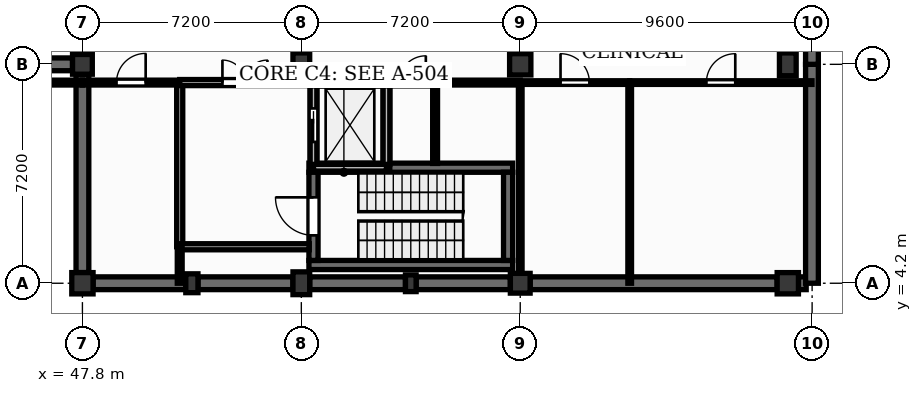
"""IFC4 building model, lengths in metres.
Left out: names, types, materials, properties, quantities, classifications, styles, units other than length and angle.
Written with IfcOpenShell. Run it as: python <this file> out.ifc"""

import sys

from ifc_helpers import new_model, si_unit, direction, frame, frame_2d, origin, origin_2d, place, context, subcontext, project, spatial, rectangle, extrude, element, fill, save


model = new_model("IFC4")
c1 = context("Model", 3, precision=1e-05, world=origin(), true_north=direction((0.0, 1.0)))
c2 = subcontext(c1, "Body", "Model", "MODEL_VIEW")
j1 = project(units=[si_unit("LENGTHUNIT", "METRE"), si_unit("PLANEANGLEUNIT", "RADIAN")], contexts=[c1])
p1 = place(None, origin())
s1 = spatial("IfcSite", under=j1, at=p1, CompositionType="ELEMENT")
p2 = place(p1, origin())
s2 = spatial("IfcBuilding", under=s1, at=p2, CompositionType="ELEMENT")
p3 = place(p2, frame((0.0, 0.0, -4.5)))
s3 = spatial("IfcBuildingStorey", under=s2, at=p3, CompositionType="ELEMENT", Elevation=-4.5)
p4 = place(p3, frame((47.8, 4.2, 0.0), z_axis=(0.0, 0.0, 1.0), x_axis=(1.0, 0.0, 0.0)))
e1 = element("IfcColumn", 1, at=p4, inside=s3, PredefinedType="COLUMN", context=c2, shape_type="SweptSolid", body=[
    extrude(rectangle(XDim=0.7, YDim=0.7, at=origin_2d()), origin(), (0.0, 0.0, 1.0), 4.2),
])
p5 = place(p3, frame((47.8, 11.4, 0.0), z_axis=(0.0, 0.0, 1.0), x_axis=(1.0, 0.0, 0.0)))
e2 = element("IfcColumn", 2, at=p5, inside=s3, PredefinedType="COLUMN", context=c2, shape_type="SweptSolid", body=[
    extrude(rectangle(XDim=0.65, YDim=0.65, at=origin_2d()), origin(), (0.0, 0.0, 1.0), 4.2),
])
for number, where, z_axis, x_axis in (
    (3, (55.0, 4.2, 0.0), (0.0, 0.0, 1.0), (1.0, 0.0, 0.0)),
    (4, (55.0, 11.4, 0.0), (0.0, 0.0, 1.0), (1.0, 0.0, 0.0)),
):
    element("IfcColumn", number, at=place(p3, frame(where, z_axis=z_axis, x_axis=x_axis)), inside=s3, PredefinedType="COLUMN", context=c2, shape_type="SweptSolid", body=[
        extrude(rectangle(XDim=0.55, YDim=0.75, at=origin_2d()), origin(), (0.0, 0.0, 1.0), 4.2),
    ])
p6 = place(p3, frame((62.2, 4.2, 0.0), z_axis=(0.0, 0.0, 1.0), x_axis=(1.0, 0.0, 0.0)))
e5 = element("IfcColumn", 5, at=p6, inside=s3, PredefinedType="COLUMN", context=c2, shape_type="SweptSolid", body=[
    extrude(rectangle(XDim=0.65, YDim=0.65, at=origin_2d()), origin(), (0.0, 0.0, 1.0), 4.2),
])
for number, where, z_axis, x_axis in (
    (6, (62.2, 11.4, 0.0), (0.0, 0.0, 1.0), (1.0, 0.0, 0.0)),
    (7, (71.0, 4.2, 0.0), (0.0, 0.0, 1.0), (1.0, 0.0, 0.0)),
):
    element("IfcColumn", number, at=place(p3, frame(where, z_axis=z_axis, x_axis=x_axis)), inside=s3, PredefinedType="COLUMN", context=c2, shape_type="SweptSolid", body=[
        extrude(rectangle(XDim=0.7, YDim=0.7, at=origin_2d()), origin(), (0.0, 0.0, 1.0), 4.2),
    ])
p7 = place(p3, frame((71.0, 11.4, 0.0), z_axis=(0.0, 0.0, 1.0), x_axis=(1.0, 0.0, 0.0)))
e8 = element("IfcColumn", 8, at=p7, inside=s3, PredefinedType="COLUMN", context=c2, shape_type="SweptSolid", body=[
    extrude(rectangle(XDim=0.55, YDim=0.75, at=origin_2d()), origin(), (0.0, 0.0, 1.0), 4.2),
])
p8 = place(p3, frame((51.4, 4.2, 0.0), z_axis=(0.0, 0.0, 1.0), x_axis=(1.0, 0.0, 0.0)))
e9 = element("IfcColumn", 9, at=p8, inside=s3, PredefinedType="PILASTER", context=c2, shape_type="SweptSolid", body=[
    extrude(rectangle(XDim=0.4, YDim=0.62, at=origin_2d()), origin(), (0.0, 0.0, 1.0), 4.2),
])
p9 = place(p3, frame((58.6, 4.2, 0.0), z_axis=(0.0, 0.0, 1.0), x_axis=(1.0, 0.0, 0.0)))
e10 = element("IfcColumn", 10, at=p9, inside=s3, PredefinedType="PILASTER", context=c2, shape_type="SweptSolid", body=[
    extrude(rectangle(XDim=0.35, YDim=0.55, at=origin_2d()), origin(), (0.0, 0.0, 1.0), 4.2),
])
p10 = place(p3, frame((40.95, 11.4, 0.0), z_axis=(0.0, 0.0, 1.0), x_axis=(1.0, 0.0, 0.0)))
e11 = element("IfcWall", 11, at=p10, inside=s3, PredefinedType="USERDEFINED", context=c2, shape_type="SweptSolid", body=[
    extrude(rectangle(XDim=6.525, YDim=0.42, at=frame_2d((3.263, 0.0))), origin(), (0.0, 0.0, 1.0), 4.2),
])
p11 = place(p3, frame((48.15, 4.2, 0.0), z_axis=(0.0, 0.0, 1.0), x_axis=(1.0, 0.0, 0.0)))
e12 = element("IfcWall", 12, at=p11, inside=s3, PredefinedType="USERDEFINED", context=c2, shape_type="SweptSolid", body=[
    extrude(rectangle(XDim=3.05, YDim=0.42, at=frame_2d((1.525, 0.0))), origin(), (0.0, 0.0, 1.0), 4.2),
])
p12 = place(p3, frame((51.6, 4.2, 0.0), z_axis=(0.0, 0.0, 1.0), x_axis=(1.0, 0.0, 0.0)))
e13 = element("IfcWall", 13, at=p12, inside=s3, PredefinedType="USERDEFINED", context=c2, shape_type="SweptSolid", body=[
    extrude(rectangle(XDim=3.125, YDim=0.42, at=frame_2d((1.562, 0.0))), origin(), (0.0, 0.0, 1.0), 4.2),
])
p13 = place(p3, frame((47.8, 4.55, 0.0), z_axis=(0.0, 0.0, 1.0), x_axis=(0.0, 1.0, 0.0)))
e14 = element("IfcWall", 14, at=p13, inside=s3, PredefinedType="USERDEFINED", context=c2, shape_type="SweptSolid", body=[
    extrude(rectangle(XDim=6.525, YDim=0.42, at=frame_2d((3.262, 0.0))), origin(), (0.0, 0.0, 1.0), 4.2),
])
p14 = place(p3, frame((55.275, 4.2, 0.0), z_axis=(0.0, 0.0, 1.0), x_axis=(1.0, 0.0, 0.0)))
e15 = element("IfcWall", 15, at=p14, inside=s3, PredefinedType="USERDEFINED", context=c2, shape_type="SweptSolid", body=[
    extrude(rectangle(XDim=3.15, YDim=0.42, at=frame_2d((1.575, 0.0))), origin(), (0.0, 0.0, 1.0), 4.2),
])
p15 = place(p3, frame((58.775, 4.2, 0.0), z_axis=(0.0, 0.0, 1.0), x_axis=(1.0, 0.0, 0.0)))
e16 = element("IfcWall", 16, at=p15, inside=s3, PredefinedType="USERDEFINED", context=c2, shape_type="SweptSolid", body=[
    extrude(rectangle(XDim=3.1, YDim=0.42, at=frame_2d((1.55, 0.0))), origin(), (0.0, 0.0, 1.0), 4.2),
])
p16 = place(p3, frame((62.525, 4.2, 0.0), z_axis=(0.0, 0.0, 1.0), x_axis=(1.0, 0.0, 0.0)))
e17 = element("IfcWall", 17, at=p16, inside=s3, PredefinedType="USERDEFINED", context=c2, shape_type="SweptSolid", body=[
    extrude(rectangle(XDim=8.125, YDim=0.42, at=frame_2d((4.062, 0.0))), origin(), (0.0, 0.0, 1.0), 4.2),
])
p17 = place(p3, frame((71.35, 4.2, 0.0), z_axis=(0.0, 0.0, 1.0), x_axis=(1.0, 0.0, 0.0)))
e18 = element("IfcWall", 18, at=p17, inside=s3, PredefinedType="USERDEFINED", context=c2, shape_type="SweptSolid", body=[
    extrude(rectangle(XDim=0.255, YDim=0.42, at=frame_2d((0.127, 0.0))), origin(), (0.0, 0.0, 1.0), 4.2),
])
p18 = place(p3, frame((71.795, 4.2, 0.0), z_axis=(0.0, 0.0, 1.0), x_axis=(0.0, 1.0, 0.0)))
e19 = element("IfcWall", 19, at=p18, inside=s3, PredefinedType="USERDEFINED", context=c2, shape_type="SweptSolid", body=[
    extrude(rectangle(XDim=7.2, YDim=0.42, at=frame_2d((3.6, 0.0))), origin(), (0.0, 0.0, 1.0), 4.2),
])
p19 = place(p3, frame((71.795, 11.4, 0.0), z_axis=(0.0, 0.0, 1.0), x_axis=(0.0, 1.0, 0.0)))
e20 = element("IfcWall", 20, at=p19, inside=s3, PredefinedType="USERDEFINED", context=c2, shape_type="SweptSolid", body=[
    extrude(rectangle(XDim=7.2, YDim=0.42, at=frame_2d((3.6, 0.0))), origin(), (0.0, 0.0, 1.0), 4.2),
])
for number, where, z_axis, x_axis in (
    (21, (55.25, 4.8, 0.0), (0.0, 0.0, 1.0), (1.0, 0.0, 0.0)),
    (22, (55.25, 8.0, 0.0), (0.0, 0.0, 1.0), (1.0, 0.0, 0.0)),
):
    element("IfcWall", number, at=place(p3, frame(where, z_axis=z_axis, x_axis=x_axis)), inside=s3, PredefinedType="SHEAR", context=c2, shape_type="SweptSolid", body=[
        extrude(rectangle(XDim=6.7, YDim=0.3, at=frame_2d((3.35, 0.0))), origin(), (0.0, 0.0, 1.0), 4.25),
    ])
p20 = place(p3, frame((55.4, 4.95, 0.0), z_axis=(0.0, 0.0, 1.0), x_axis=(0.0, 1.0, 0.0)))
e23 = element("IfcWall", 23, at=p20, inside=s3, PredefinedType="SHEAR", context=c2, shape_type="SweptSolid", body=[
    extrude(rectangle(XDim=2.9, YDim=0.3, at=frame_2d((1.45, 0.0))), origin(), (0.0, 0.0, 1.0), 4.25),
])
p21 = place(p20, frame((0.825, 0.0, 0.0)))
e24 = element("IfcOpeningElement", 24, at=p21, cuts=e23, PredefinedType="OPENING", context=c2, shape_type="SweptSolid", body=[
    extrude(rectangle(XDim=1.25, YDim=2.15, at=frame_2d((0.625, 1.075))), frame((0.0, 0.16, 0.0), z_axis=(0.0, -1.0, 0.0), x_axis=(1.0, 0.0, 0.0)), (0.0, 0.0, 1.0), 0.32),
])
p22 = place(p3, frame((61.8, 4.95, 0.0), z_axis=(0.0, 0.0, 1.0), x_axis=(0.0, 1.0, 0.0)))
e25 = element("IfcWall", 25, at=p22, inside=s3, PredefinedType="SHEAR", context=c2, shape_type="SweptSolid", body=[
    extrude(rectangle(XDim=2.9, YDim=0.3, at=frame_2d((1.45, 0.0))), origin(), (0.0, 0.0, 1.0), 4.25),
])
p23 = place(p3, frame((55.4, 10.8, 0.0), z_axis=(0.0, 0.0, 1.0), x_axis=(1.0, 0.0, 0.0)))
e26 = element("IfcWall", 26, at=p23, inside=s3, PredefinedType="SOLIDWALL", context=c2, shape_type="SweptSolid", body=[
    extrude(rectangle(XDim=2.4, YDim=0.22, at=frame_2d((1.2, 0.0))), origin(), (0.0, 0.0, 1.0), 4.25),
])
p24 = place(p3, frame((55.4, 8.11, 0.0), z_axis=(0.0, 0.0, 1.0), x_axis=(0.0, 1.0, 0.0)))
e27 = element("IfcWall", 27, at=p24, inside=s3, PredefinedType="SOLIDWALL", context=c2, shape_type="SweptSolid", body=[
    extrude(rectangle(XDim=2.58, YDim=0.22, at=frame_2d((1.29, 0.0))), origin(), (0.0, 0.0, 1.0), 4.25),
])
p25 = place(p24, frame((0.74, 0.0, 0.0)))
e28 = element("IfcOpeningElement", 28, at=p25, cuts=e27, PredefinedType="OPENING", context=c2, shape_type="SweptSolid", body=[
    extrude(rectangle(XDim=1.1, YDim=2.15, at=frame_2d((0.55, 1.075))), frame((0.0, 0.12, 0.0), z_axis=(0.0, -1.0, 0.0), x_axis=(1.0, 0.0, 0.0)), (0.0, 0.0, 1.0), 0.24),
])
p26 = place(p3, frame((57.8, 8.11, 0.0), z_axis=(0.0, 0.0, 1.0), x_axis=(0.0, 1.0, 0.0)))
e29 = element("IfcWall", 29, at=p26, inside=s3, PredefinedType="SOLIDWALL", context=c2, shape_type="SweptSolid", body=[
    extrude(rectangle(XDim=2.58, YDim=0.22, at=frame_2d((1.29, 0.0))), origin(), (0.0, 0.0, 1.0), 4.25),
])
for number, where, z_axis, x_axis in (
    (30, (55.4, 8.0, -0.9), (0.0, 0.0, 1.0), (0.0, 1.0, 0.0)),
    (31, (57.8, 8.0, -0.9), (0.0, 0.0, 1.0), (0.0, 1.0, 0.0)),
):
    element("IfcWall", number, at=place(p3, frame(where, z_axis=z_axis, x_axis=x_axis)), inside=s3, PredefinedType="SOLIDWALL", context=c2, shape_type="SweptSolid", body=[
        extrude(rectangle(XDim=2.8, YDim=0.22, at=frame_2d((1.4, 0.0))), origin(), (0.0, 0.0, 1.0), 0.9),
    ])
for number, where, z_axis, x_axis in (
    (32, (55.4, 8.0, -0.9), (0.0, 0.0, 1.0), (1.0, 0.0, 0.0)),
    (33, (55.4, 10.8, -0.9), (0.0, 0.0, 1.0), (1.0, 0.0, 0.0)),
):
    element("IfcWall", number, at=place(p3, frame(where, z_axis=z_axis, x_axis=x_axis)), inside=s3, PredefinedType="SOLIDWALL", context=c2, shape_type="SweptSolid", body=[
        extrude(rectangle(XDim=2.4, YDim=0.22, at=frame_2d((1.2, 0.0))), origin(), (0.0, 0.0, 1.0), 0.9),
    ])
p27 = place(p3, frame((47.8, 10.8, 0.0), z_axis=(0.0, 0.0, 1.0), x_axis=(1.0, 0.0, 0.0)))
e34 = element("IfcWall", 34, at=p27, inside=s3, PredefinedType="PARTITIONING", context=c2, shape_type="SweptSolid", body=[
    extrude(rectangle(XDim=3.2, YDim=0.16, at=frame_2d((1.6, 0.0))), origin(), (0.0, 0.0, 1.0), 4.08),
])
p28 = place(p27, frame((1.12, 0.0, 0.0)))
e35 = element("IfcOpeningElement", 35, at=p28, cuts=e34, PredefinedType="OPENING", context=c2, shape_type="SweptSolid", body=[
    extrude(rectangle(XDim=0.96, YDim=2.1, at=frame_2d((0.48, 1.05))), frame((0.0, 0.09, 0.0), z_axis=(0.0, -1.0, 0.0), x_axis=(1.0, 0.0, 0.0)), (0.0, 0.0, 1.0), 0.18),
])
p29 = place(p3, frame((51.0, 5.4, 0.0), z_axis=(0.0, 0.0, 1.0), x_axis=(0.0, 1.0, 0.0)))
e36 = element("IfcWall", 36, at=p29, inside=s3, PredefinedType="PARTITIONING", context=c2, shape_type="SweptSolid", body=[
    extrude(rectangle(XDim=5.33, YDim=0.2, at=frame_2d((2.665, 0.0))), origin(), (0.0, 0.0, 1.0), 4.08),
])
p30 = place(p3, frame((51.0, 10.8, 0.0), z_axis=(0.0, 0.0, 1.0), x_axis=(1.0, 0.0, 0.0)))
e37 = element("IfcWall", 37, at=p30, inside=s3, PredefinedType="PARTITIONING", context=c2, shape_type="SweptSolid", body=[
    extrude(rectangle(XDim=4.29, YDim=0.2, at=frame_2d((2.145, 0.0))), origin(), (0.0, 0.0, 1.0), 4.08),
])
p31 = place(p30, frame((1.405, 0.0, 0.0)))
e38 = element("IfcOpeningElement", 38, at=p31, cuts=e37, PredefinedType="OPENING", context=c2, shape_type="SweptSolid", body=[
    extrude(rectangle(XDim=1.48, YDim=2.25, at=frame_2d((0.74, 1.125))), frame((0.0, 0.11, 0.0), z_axis=(0.0, -1.0, 0.0), x_axis=(1.0, 0.0, 0.0)), (0.0, 0.0, 1.0), 0.22),
])
p32 = place(p3, frame((57.91, 10.8, 0.0), z_axis=(0.0, 0.0, 1.0), x_axis=(1.0, 0.0, 0.0)))
e39 = element("IfcWall", 39, at=p32, inside=s3, PredefinedType="SOLIDWALL", context=c2, shape_type="SweptSolid", body=[
    extrude(rectangle(XDim=1.49, YDim=0.22, at=frame_2d((0.745, 0.0))), origin(), (0.0, 0.0, 1.0), 4.08),
])
p33 = place(p32, frame((0.305, 0.0, 0.0)))
e40 = element("IfcOpeningElement", 40, at=p33, cuts=e39, PredefinedType="OPENING", context=c2, shape_type="SweptSolid", body=[
    extrude(rectangle(XDim=0.88, YDim=2.05, at=frame_2d((0.44, 1.025))), frame((0.0, 0.12, 0.0), z_axis=(0.0, -1.0, 0.0), x_axis=(1.0, 0.0, 0.0)), (0.0, 0.0, 1.0), 0.24),
])
p34 = place(p3, frame((62.2, 10.8, 0.0), z_axis=(0.0, 0.0, 1.0), x_axis=(1.0, 0.0, 0.0)))
e41 = element("IfcWall", 41, at=p34, inside=s3, PredefinedType="PLUMBINGWALL", context=c2, shape_type="SweptSolid", body=[
    extrude(rectangle(XDim=3.6, YDim=0.12, at=frame_2d((1.8, 0.0))), origin(), (0.0, 0.0, 1.0), 4.08),
])
p35 = place(p34, frame((1.325, 0.0, 0.0)))
e42 = element("IfcOpeningElement", 42, at=p35, cuts=e41, PredefinedType="OPENING", context=c2, shape_type="SweptSolid", body=[
    extrude(rectangle(XDim=0.95, YDim=2.1, at=frame_2d((0.475, 1.05))), frame((0.0, 0.07, 0.0), z_axis=(0.0, -1.0, 0.0), x_axis=(1.0, 0.0, 0.0)), (0.0, 0.0, 1.0), 0.14),
])
p36 = place(p3, frame((65.8, 4.2, 0.0), z_axis=(0.0, 0.0, 1.0), x_axis=(0.0, 1.0, 0.0)))
e43 = element("IfcWall", 43, at=p36, inside=s3, PredefinedType="PLUMBINGWALL", context=c2, shape_type="SweptSolid", body=[
    extrude(rectangle(XDim=6.53, YDim=0.12, at=frame_2d((3.265, 0.0))), origin(), (0.0, 0.0, 1.0), 4.08),
])
p37 = place(p3, frame((65.8, 10.8, 0.0), z_axis=(0.0, 0.0, 1.0), x_axis=(1.0, 0.0, 0.0)))
e44 = element("IfcWall", 44, at=p37, inside=s3, PredefinedType="PLUMBINGWALL", context=c2, shape_type="SweptSolid", body=[
    extrude(rectangle(XDim=5.995, YDim=0.12, at=frame_2d((2.998, 0.0))), origin(), (0.0, 0.0, 1.0), 4.08),
])
p38 = place(p37, frame((2.522, 0.0, 0.0)))
e45 = element("IfcOpeningElement", 45, at=p38, cuts=e44, PredefinedType="OPENING", context=c2, shape_type="SweptSolid", body=[
    extrude(rectangle(XDim=0.95, YDim=2.1, at=frame_2d((0.475, 1.05))), frame((0.0, 0.07, 0.0), z_axis=(0.0, -1.0, 0.0), x_axis=(1.0, 0.0, 0.0)), (0.0, 0.0, 1.0), 0.14),
])
p39 = place(p3, frame((59.4, 8.14, 0.0), z_axis=(0.0, 0.0, 1.0), x_axis=(0.0, 1.0, 0.0)))
e46 = element("IfcWall", 46, at=p39, inside=s3, PredefinedType="PARTITIONING", context=c2, shape_type="SweptSolid", body=[
    extrude(rectangle(XDim=2.59, YDim=0.16, at=frame_2d((1.295, 0.0))), origin(), (0.0, 0.0, 1.0), 4.08),
])
p40 = place(p3, frame((51.0, 5.4, 0.0), z_axis=(0.0, 0.0, 1.0), x_axis=(1.0, 0.0, 0.0)))
e47 = element("IfcWall", 47, at=p40, inside=s3, PredefinedType="PARTITIONING", context=c2, shape_type="SweptSolid", body=[
    extrude(rectangle(XDim=4.26, YDim=0.2, at=frame_2d((2.13, 0.0))), origin(), (0.0, 0.0, 1.0), 4.08),
])
p41 = place(p3, frame((40.6, 10.8, 0.0), z_axis=(0.0, 0.0, 1.0), x_axis=(1.0, 0.0, 0.0)))
e48 = element("IfcWall", 48, at=p41, inside=s3, PredefinedType="PARTITIONING", context=c2, shape_type="SweptSolid", body=[
    extrude(rectangle(XDim=7.2, YDim=0.16, at=frame_2d((3.6, 0.0))), origin(), (0.0, 0.0, 1.0), 4.08),
])
p42 = place(p3, frame((59.4, 10.8, 0.0), z_axis=(0.0, 0.0, 1.0), x_axis=(1.0, 0.0, 0.0)))
e49 = element("IfcWall", 49, at=p42, inside=s3, PredefinedType="PARTITIONING", context=c2, shape_type="SweptSolid", body=[
    extrude(rectangle(XDim=2.8, YDim=0.16, at=frame_2d((1.4, 0.0))), origin(), (0.0, 0.0, 1.0), 4.08),
])
p43 = place(p3, frame((62.2, 4.525, 0.0), z_axis=(0.0, 0.0, 1.0), x_axis=(0.0, 1.0, 0.0)))
e50 = element("IfcWall", 50, at=p43, inside=s3, PredefinedType="PLUMBINGWALL", context=c2, shape_type="SweptSolid", body=[
    extrude(rectangle(XDim=6.205, YDim=0.12, at=frame_2d((3.103, 0.0))), origin(), (0.0, 0.0, 1.0), 3.5),
])
p44 = place(p3, frame((51.0, 4.2, 0.0), z_axis=(0.0, 0.0, 1.0), x_axis=(0.0, 1.0, 0.0)))
e51 = element("IfcWall", 51, at=p44, inside=s3, PredefinedType="PARTITIONING", context=c2, shape_type="SweptSolid", body=[
    extrude(rectangle(XDim=1.2, YDim=0.16, at=frame_2d((0.6, 0.0))), origin(), (0.0, 0.0, 1.0), 4.08),
])
p45 = place(p25, origin())
e52 = element("IfcDoor", 52, at=p45, inside=s3, OperationType="SLIDING_TO_LEFT", PredefinedType="DOOR", context=c2, shape_type="SweptSolid", body=[
    extrude(rectangle(XDim=1.1, YDim=2.15, at=frame_2d((0.55, 1.075))), frame((0.0, 0.025, 0.0), z_axis=(0.0, -1.0, 0.0), x_axis=(1.0, 0.0, 0.0)), (0.0, 0.0, 1.0), 0.05),
])
fill(e28, e52)
p46 = place(p21, origin())
e53 = element("IfcDoor", 53, at=p46, inside=s3, OperationType="SINGLE_SWING_RIGHT", PredefinedType="DOOR", context=c2, shape_type="SweptSolid", body=[
    extrude(rectangle(XDim=1.25, YDim=2.15, at=frame_2d((0.625, 1.075))), frame((0.0, 0.025, 0.0), z_axis=(0.0, -1.0, 0.0), x_axis=(1.0, 0.0, 0.0)), (0.0, 0.0, 1.0), 0.05),
])
fill(e24, e53)
p47 = place(p31, origin())
e54 = element("IfcDoor", 54, at=p47, inside=s3, OperationType="DOUBLE_DOOR_SINGLE_SWING", PredefinedType="DOOR", context=c2, shape_type="SweptSolid", body=[
    extrude(rectangle(XDim=1.48, YDim=2.25, at=frame_2d((0.74, 1.125))), frame((0.0, 0.025, 0.0), z_axis=(0.0, -1.0, 0.0), x_axis=(1.0, 0.0, 0.0)), (0.0, 0.0, 1.0), 0.05),
])
fill(e38, e54)
p48 = place(p33, origin())
e55 = element("IfcDoor", 55, at=p48, inside=s3, OperationType="SINGLE_SWING_RIGHT", PredefinedType="DOOR", context=c2, shape_type="SweptSolid", body=[
    extrude(rectangle(XDim=0.88, YDim=2.05, at=frame_2d((0.44, 1.025))), frame((0.0, 0.025, 0.0), z_axis=(0.0, -1.0, 0.0), x_axis=(1.0, 0.0, 0.0)), (0.0, 0.0, 1.0), 0.05),
])
fill(e40, e55)
p49 = place(p35, origin())
e56 = element("IfcDoor", 56, at=p49, inside=s3, OperationType="SINGLE_SWING_LEFT", PredefinedType="DOOR", context=c2, shape_type="SweptSolid", body=[
    extrude(rectangle(XDim=0.95, YDim=2.1, at=frame_2d((0.475, 1.05))), frame((0.0, 0.025, 0.0), z_axis=(0.0, -1.0, 0.0), x_axis=(1.0, 0.0, 0.0)), (0.0, 0.0, 1.0), 0.05),
])
fill(e42, e56)
p50 = place(p38, origin())
e57 = element("IfcDoor", 57, at=p50, inside=s3, OperationType="SINGLE_SWING_RIGHT", PredefinedType="DOOR", context=c2, shape_type="SweptSolid", body=[
    extrude(rectangle(XDim=0.95, YDim=2.1, at=frame_2d((0.475, 1.05))), frame((0.0, 0.025, 0.0), z_axis=(0.0, -1.0, 0.0), x_axis=(1.0, 0.0, 0.0)), (0.0, 0.0, 1.0), 0.05),
])
fill(e45, e57)
p51 = place(p28, origin())
e58 = element("IfcDoor", 58, at=p51, inside=s3, OperationType="SINGLE_SWING_RIGHT", PredefinedType="DOOR", context=c2, shape_type="SweptSolid", body=[
    extrude(rectangle(XDim=0.96, YDim=2.1, at=frame_2d((0.48, 1.05))), frame((0.0, 0.025, 0.0), z_axis=(0.0, -1.0, 0.0), x_axis=(1.0, 0.0, 0.0)), (0.0, 0.0, 1.0), 0.05),
])
fill(e35, e58)
save(model, sys.argv[1])
